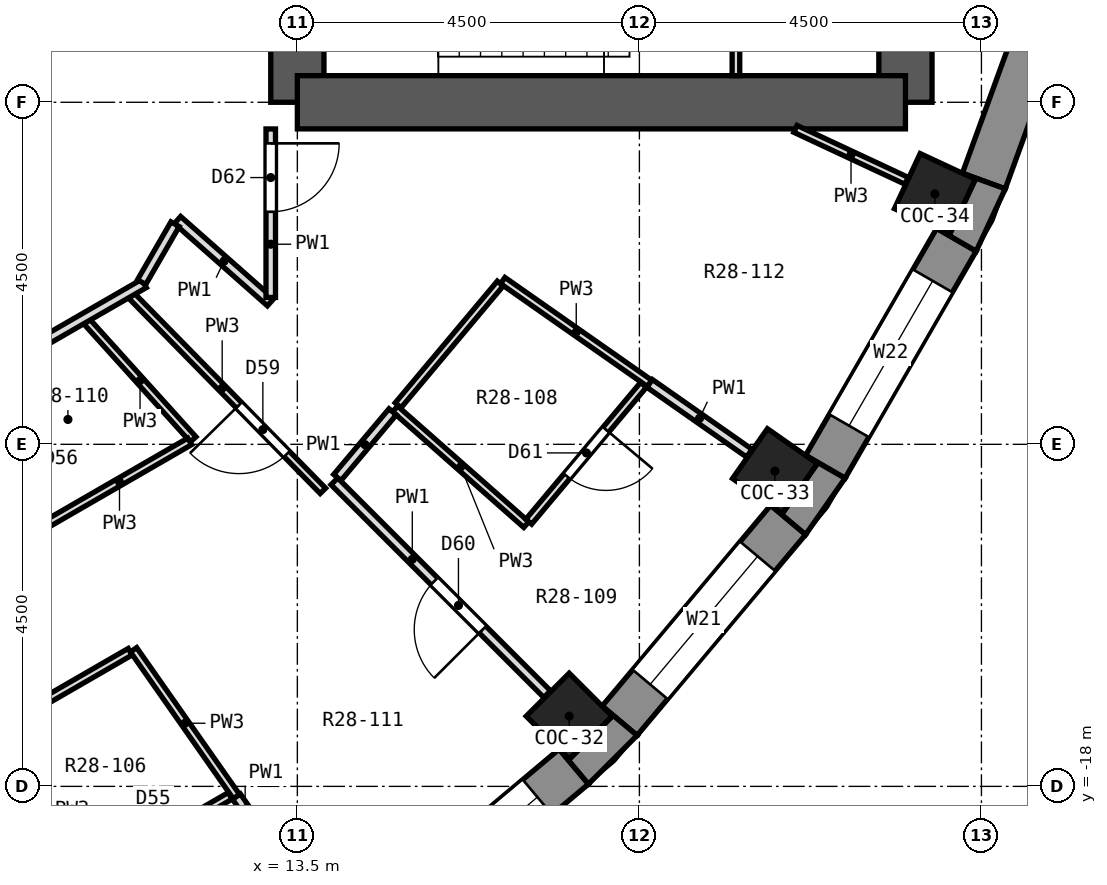
"""IFC4 building model, lengths in metres.
Left out: names, types, materials, properties, quantities, classifications, styles, units other than length and angle.
Written with IfcOpenShell. Run it as: python <this file> out.ifc"""

import sys

from ifc_helpers import new_model, si_unit, direction, frame, frame_2d, origin, origin_2d, place, context, subcontext, project, spatial, polyline, rectangle, outline, extrude, element, fill, save


model = new_model("IFC4")
c1 = context("Model", 3, precision=1e-05, world=origin(), true_north=direction((0.0, 1.0)))
c2 = subcontext(c1, "Body", "Model", "MODEL_VIEW")
j1 = project(units=[si_unit("LENGTHUNIT", "METRE"), si_unit("PLANEANGLEUNIT", "RADIAN")], contexts=[c1])
p1 = place(None, origin())
s1 = spatial("IfcSite", under=j1, at=p1, CompositionType="ELEMENT")
p2 = place(p1, origin())
s2 = spatial("IfcBuilding", under=s1, at=p2, CompositionType="ELEMENT")
p3 = place(p2, frame((0.0, 0.0, 190.5)))
s3 = spatial("IfcBuildingStorey", under=s2, at=p3, CompositionType="ELEMENT", Elevation=190.5)
for number, where, z_axis, x_axis in (
    (1, (17.077, -17.077, 0.0), (0.0, 0.0, 1.0), (0.707, -0.707, 0.0)),
    (2, (19.782, -13.852, 0.0), (0.0, 0.0, 1.0), (0.819, -0.574, 0.0)),
    (3, (21.887, -10.206, 0.0), (0.0, 0.0, 1.0), (0.906, -0.423, 0.0)),
):
    element("IfcColumn", number, at=place(p3, frame(where, z_axis=z_axis, x_axis=x_axis)), inside=s3, PredefinedType="COLUMN", context=c2, shape_type="SweptSolid", body=[
        extrude(rectangle(XDim=0.8, YDim=0.8, at=origin_2d()), origin(), (0.0, 0.0, 1.0), 3.3),
    ])
p4 = place(p3, frame((13.5, -9.0, 0.0), z_axis=(0.0, 0.0, 1.0), x_axis=(0.0, 1.0, 0.0)))
e4 = element("IfcWall", 4, at=p4, inside=s3, PredefinedType="SHEAR", context=c2, shape_type="SweptSolid", body=[
    extrude(rectangle(XDim=18.0, YDim=0.7, at=frame_2d((9.0, 0.0))), origin(), (0.0, 0.0, 1.0), 3.3),
])
p5 = place(p4, frame((15.4, 0.0, 0.0)))
e5 = element("IfcOpeningElement", 5, at=p5, cuts=e4, PredefinedType="OPENING", context=c2, shape_type="SweptSolid", body=[
    extrude(rectangle(XDim=1.2, YDim=2.1, at=frame_2d((0.6, 1.05))), frame((0.0, 0.362, 0.0), z_axis=(0.0, -1.0, 0.0), x_axis=(1.0, 0.0, 0.0)), (0.0, 0.0, 1.0), 0.724),
])
p6 = place(p4, frame((1.4, 0.0, 0.0)))
e6 = element("IfcOpeningElement", 6, at=p6, cuts=e4, PredefinedType="OPENING", context=c2, shape_type="SweptSolid", body=[
    extrude(rectangle(XDim=1.2, YDim=2.1, at=frame_2d((0.6, 1.05))), frame((0.0, 0.362, 0.0), z_axis=(0.0, -1.0, 0.0), x_axis=(1.0, 0.0, 0.0)), (0.0, 0.0, 1.0), 0.724),
])
p7 = place(p4, frame((7.5, 0.0, 0.0)))
e7 = element("IfcOpeningElement", 7, at=p7, cuts=e4, PredefinedType="OPENING", context=c2, shape_type="SweptSolid", body=[
    extrude(rectangle(XDim=3.0, YDim=2.4, at=frame_2d((1.5, 1.2))), frame((0.0, 0.362, 0.0), z_axis=(0.0, -1.0, 0.0), x_axis=(1.0, 0.0, 0.0)), (0.0, 0.0, 1.0), 0.724),
])
p8 = place(p3, frame((21.5, -9.0, 0.0), z_axis=(0.0, 0.0, 1.0), x_axis=(0.0, 1.0, 0.0)))
e8 = element("IfcWall", 8, at=p8, inside=s3, PredefinedType="SHEAR", context=c2, shape_type="SweptSolid", body=[
    extrude(rectangle(XDim=18.0, YDim=0.7, at=frame_2d((9.0, 0.0))), origin(), (0.0, 0.0, 1.0), 3.3),
])
p9 = place(p8, frame((9.45, 0.0, 0.0)))
e9 = element("IfcOpeningElement", 9, at=p9, cuts=e8, PredefinedType="OPENING", context=c2, shape_type="SweptSolid", body=[
    extrude(rectangle(XDim=0.9, YDim=2.1, at=frame_2d((0.45, 1.05))), frame((0.0, 0.362, 0.0), z_axis=(0.0, -1.0, 0.0), x_axis=(1.0, 0.0, 0.0)), (0.0, 0.0, 1.0), 0.724),
])
p10 = place(p8, frame((7.65, 0.0, 0.0)))
e10 = element("IfcOpeningElement", 10, at=p10, cuts=e8, PredefinedType="OPENING", context=c2, shape_type="SweptSolid", body=[
    extrude(rectangle(XDim=0.9, YDim=2.1, at=frame_2d((0.45, 1.05))), frame((0.0, 0.362, 0.0), z_axis=(0.0, -1.0, 0.0), x_axis=(1.0, 0.0, 0.0)), (0.0, 0.0, 1.0), 0.724),
])
p11 = place(p3, frame((13.5, -9.0, 0.0), z_axis=(0.0, 0.0, 1.0), x_axis=(1.0, 0.0, 0.0)))
e11 = element("IfcWall", 11, at=p11, inside=s3, PredefinedType="SHEAR", context=c2, shape_type="SweptSolid", body=[
    extrude(rectangle(XDim=8.0, YDim=0.7, at=frame_2d((4.0, 0.0))), origin(), (0.0, 0.0, 1.0), 3.3),
])
p12 = place(p3, frame((14.494, -19.957, 0.0), z_axis=(0.0, 0.0, 1.0), x_axis=(0.766058884809, 0.642770398358, 0.0)))
e12 = element("IfcWall", 12, at=p12, inside=s3, PredefinedType="SOLIDWALL", context=c2, shape_type="SweptSolid", body=[
    extrude(rectangle(XDim=3.449, YDim=0.6, at=frame_2d((1.725, 0.0))), origin(), (0.0, 0.0, 1.0), 2.85),
])
p13 = place(p12, frame((0.625, 0.0, 0.9)))
e13 = element("IfcOpeningElement", 13, at=p13, cuts=e12, PredefinedType="OPENING", context=c2, shape_type="SweptSolid", body=[
    extrude(rectangle(XDim=2.2, YDim=1.8, at=frame_2d((1.1, 0.9))), frame((0.0, 0.312, 0.0), z_axis=(0.0, -1.0, 0.0), x_axis=(1.0, 0.0, 0.0)), (0.0, 0.0, 1.0), 0.624),
])
p14 = place(p3, frame((17.74, -17.137, 0.0), z_axis=(0.0, 0.0, 1.0), x_axis=(0.642770398358, 0.766058884809, 0.0)))
e14 = element("IfcWall", 14, at=p14, inside=s3, PredefinedType="SOLIDWALL", context=c2, shape_type="SweptSolid", body=[
    extrude(rectangle(XDim=3.449, YDim=0.6, at=frame_2d((1.725, 0.0))), origin(), (0.0, 0.0, 1.0), 2.85),
])
p15 = place(p14, frame((0.625, 0.0, 0.9)))
e15 = element("IfcOpeningElement", 15, at=p15, cuts=e14, PredefinedType="OPENING", context=c2, shape_type="SweptSolid", body=[
    extrude(rectangle(XDim=2.2, YDim=1.8, at=frame_2d((1.1, 0.9))), frame((0.0, 0.312, 0.0), z_axis=(0.0, -1.0, 0.0), x_axis=(1.0, 0.0, 0.0)), (0.0, 0.0, 1.0), 0.624),
])
p16 = place(p3, frame((20.446, -13.796, 0.0), z_axis=(0.0, 0.0, 1.0), x_axis=(0.499998129301, 0.86602648383, 0.0)))
e16 = element("IfcWall", 16, at=p16, inside=s3, PredefinedType="SOLIDWALL", context=c2, shape_type="SweptSolid", body=[
    extrude(rectangle(XDim=3.45, YDim=0.6, at=frame_2d((1.725, 0.0))), origin(), (0.0, 0.0, 1.0), 2.85),
])
p17 = place(p16, frame((0.625, 0.0, 0.9)))
e17 = element("IfcOpeningElement", 17, at=p17, cuts=e16, PredefinedType="OPENING", context=c2, shape_type="SweptSolid", body=[
    extrude(rectangle(XDim=2.2, YDim=1.8, at=frame_2d((1.1, 0.9))), frame((0.0, 0.312, 0.0), z_axis=(0.0, -1.0, 0.0), x_axis=(1.0, 0.0, 0.0)), (0.0, 0.0, 1.0), 0.624),
])
p18 = place(p3, frame((22.531, -10.036, 0.0), z_axis=(0.0, 0.0, 1.0), x_axis=(0.342032843455, 0.93968799822, 0.0)))
e18 = element("IfcWall", 18, at=p18, inside=s3, PredefinedType="SOLIDWALL", context=c2, shape_type="SweptSolid", body=[
    extrude(rectangle(XDim=3.45, YDim=0.6, at=frame_2d((1.725, 0.0))), origin(), (0.0, 0.0, 1.0), 2.85),
])
p19 = place(p3, origin())
e19 = element("IfcWall", 19, at=p19, inside=s3, PredefinedType="SOLIDWALL", context=c2, shape_type="SweptSolid", body=[
    extrude(outline(polyline([(17.969, -17.33), (17.51, -16.944), (17.642, -17.077), (17.077, -17.642), (16.944, -17.51), (17.33, -17.969), (17.969, -17.33)])), origin(), (0.0, 0.0, 1.0), 2.85),
])
p20 = place(p3, origin())
e20 = element("IfcWall", 20, at=p20, inside=s3, PredefinedType="SOLIDWALL", context=c2, shape_type="SweptSolid", body=[
    extrude(outline(polyline([(20.187, -14.687), (20.706, -13.946), (20.186, -13.646), (20.34, -13.754), (19.881, -14.409), (19.727, -14.302), (20.187, -14.687)])), origin(), (0.0, 0.0, 1.0), 2.85),
])
p21 = place(p3, origin())
e21 = element("IfcWall", 21, at=p21, inside=s3, PredefinedType="SOLIDWALL", context=c2, shape_type="SweptSolid", body=[
    extrude(outline(polyline([(22.813, -10.139), (22.249, -9.934), (22.419, -10.013), (22.081, -10.738), (21.911, -10.659), (22.431, -10.959), (22.813, -10.139)])), origin(), (0.0, 0.0, 1.0), 2.85),
])
p22 = place(p3, frame((9.436, -17.305, 0.0), z_axis=(0.0, 0.0, 1.0), x_axis=(0.478926465157, -0.877855022753, 0.0)))
e22 = element("IfcWall", 22, at=p22, inside=s3, PredefinedType="PARTITIONING", context=c2, shape_type="SweptSolid", body=[
    extrude(rectangle(XDim=2.301, YDim=0.1, at=frame_2d((1.15, 0.0))), origin(), (0.0, 0.0, 1.0), 2.85),
])
p23 = place(p3, frame((11.345, -16.203, 0.0), z_axis=(0.0, 0.0, 1.0), x_axis=(0.573823443789, -0.818979032307, 0.0)))
e23 = element("IfcWall", 23, at=p23, inside=s3, PredefinedType="PARTITIONING", context=c2, shape_type="SweptSolid", body=[
    extrude(rectangle(XDim=2.359, YDim=0.1, at=frame_2d((1.18, 0.0))), origin(), (0.0, 0.0, 1.0), 2.85),
])
p24 = place(p3, frame((12.699, -18.135, 0.0), z_axis=(0.0, 0.0, 1.0), x_axis=(0.57352374907, -0.819188933795, 0.0)))
e24 = element("IfcWall", 24, at=p24, inside=s3, PredefinedType="PARTITIONING", context=c2, shape_type="SweptSolid", body=[
    extrude(rectangle(XDim=1.601, YDim=0.125, at=frame_2d((0.801, 0.0))), origin(), (0.0, 0.0, 1.0), 2.85),
])
p25 = place(p24, frame((0.553, 0.0, 0.0)))
e25 = element("IfcOpeningElement", 25, at=p25, cuts=e24, PredefinedType="OPENING", context=c2, shape_type="SweptSolid", body=[
    extrude(rectangle(XDim=0.9, YDim=2.1, at=frame_2d((0.45, 1.05))), frame((0.0, 0.074, 0.0), z_axis=(0.0, -1.0, 0.0), x_axis=(1.0, 0.0, 0.0)), (0.0, 0.0, 1.0), 0.149),
])
p26 = place(p3, frame((10.732, -11.888, 0.0), z_axis=(0.0, 0.0, 1.0), x_axis=(0.670051109138, -0.742314967613, 0.0)))
e26 = element("IfcWall", 26, at=p26, inside=s3, PredefinedType="PARTITIONING", context=c2, shape_type="SweptSolid", body=[
    extrude(rectangle(XDim=2.084, YDim=0.1, at=frame_2d((1.042, 0.0))), origin(), (0.0, 0.0, 1.0), 2.85),
])
p27 = place(p3, frame((11.321, -11.547, 0.0), z_axis=(0.0, 0.0, 1.0), x_axis=(0.700209333058, -0.713937595241, 0.0)))
e27 = element("IfcWall", 27, at=p27, inside=s3, PredefinedType="PARTITIONING", context=c2, shape_type="SweptSolid", body=[
    extrude(rectangle(XDim=3.592, YDim=0.1, at=frame_2d((1.796, 0.0))), origin(), (0.0, 0.0, 1.0), 2.85),
])
p28 = place(p27, frame((2.014, 0.0, 0.0)))
e28 = element("IfcOpeningElement", 28, at=p28, cuts=e27, PredefinedType="OPENING", context=c2, shape_type="SweptSolid", body=[
    extrude(rectangle(XDim=0.9, YDim=2.1, at=frame_2d((0.45, 1.05))), frame((0.0, 0.062, 0.0), z_axis=(0.0, -1.0, 0.0), x_axis=(1.0, 0.0, 0.0)), (0.0, 0.0, 1.0), 0.124),
])
p29 = place(p3, frame((13.987, -13.987, 0.0), z_axis=(0.0, 0.0, 1.0), x_axis=(0.707106781187, -0.707106781187, 0.0)))
e29 = element("IfcWall", 29, at=p29, inside=s3, PredefinedType="PARTITIONING", context=c2, shape_type="SweptSolid", body=[
    extrude(rectangle(XDim=3.959, YDim=0.125, at=frame_2d((1.979, 0.0))), origin(), (0.0, 0.0, 1.0), 2.85),
])
p30 = place(p29, frame((1.859, 0.0, 0.0)))
e30 = element("IfcOpeningElement", 30, at=p30, cuts=e29, PredefinedType="OPENING", context=c2, shape_type="SweptSolid", body=[
    extrude(rectangle(XDim=0.9, YDim=2.1, at=frame_2d((0.45, 1.05))), frame((0.0, 0.074, 0.0), z_axis=(0.0, -1.0, 0.0), x_axis=(1.0, 0.0, 0.0)), (0.0, 0.0, 1.0), 0.149),
])
p31 = place(p3, frame((11.923, -10.549, 0.0), z_axis=(0.0, 0.0, 1.0), x_axis=(0.749253207289, -0.662283648724, 0.0)))
e31 = element("IfcWall", 31, at=p31, inside=s3, PredefinedType="PARTITIONING", context=c2, shape_type="SweptSolid", body=[
    extrude(rectangle(XDim=1.634, YDim=0.125, at=frame_2d((0.817, 0.0))), origin(), (0.0, 0.0, 1.0), 2.85),
])
p32 = place(p3, frame((14.786, -13.034, 0.0), z_axis=(0.0, 0.0, 1.0), x_axis=(0.750060726962, -0.661368963491, 0.0)))
e32 = element("IfcWall", 32, at=p32, inside=s3, PredefinedType="PARTITIONING", context=c2, shape_type="SweptSolid", body=[
    extrude(rectangle(XDim=2.301, YDim=0.1, at=frame_2d((1.151, 0.0))), origin(), (0.0, 0.0, 1.0), 2.85),
])
p33 = place(p3, frame((16.202, -11.346, 0.0), z_axis=(0.0, 0.0, 1.0), x_axis=(0.81919302467, -0.573517905851, 0.0)))
e33 = element("IfcWall", 33, at=p33, inside=s3, PredefinedType="PARTITIONING", context=c2, shape_type="SweptSolid", body=[
    extrude(rectangle(XDim=2.359, YDim=0.1, at=frame_2d((1.18, 0.0))), origin(), (0.0, 0.0, 1.0), 2.85),
])
p34 = place(p3, frame((18.135, -12.699, 0.0), z_axis=(0.0, 0.0, 1.0), x_axis=(0.819188933795, -0.57352374907, 0.0)))
e34 = element("IfcWall", 34, at=p34, inside=s3, PredefinedType="PARTITIONING", context=c2, shape_type="SweptSolid", body=[
    extrude(rectangle(XDim=1.601, YDim=0.125, at=frame_2d((0.801, 0.0))), origin(), (0.0, 0.0, 1.0), 2.85),
])
p35 = place(p3, frame((20.053, -9.35, 0.0), z_axis=(0.0, 0.0, 1.0), x_axis=(0.906055596822, -0.423158664648, 0.0)))
e35 = element("IfcWall", 35, at=p35, inside=s3, PredefinedType="PARTITIONING", context=c2, shape_type="SweptSolid", body=[
    extrude(rectangle(XDim=1.614, YDim=0.1, at=frame_2d((0.807, 0.0))), origin(), (0.0, 0.0, 1.0), 2.85),
])
p36 = place(p3, frame((10.581, -19.3, 0.0), z_axis=(0.0, 0.0, 1.0), x_axis=(0.866009076391, 0.500028278809, 0.0)))
e36 = element("IfcWall", 36, at=p36, inside=s3, PredefinedType="PARTITIONING", context=c2, shape_type="SweptSolid", body=[
    extrude(rectangle(XDim=2.349, YDim=0.1, at=frame_2d((1.175, 0.0))), origin(), (0.0, 0.0, 1.0), 2.85),
])
p37 = place(p36, frame((0.781, 0.0, 0.0)))
e37 = element("IfcOpeningElement", 37, at=p37, cuts=e36, PredefinedType="OPENING", context=c2, shape_type="SweptSolid", body=[
    extrude(rectangle(XDim=0.8, YDim=2.1, at=frame_2d((0.4, 1.05))), frame((0.0, 0.062, 0.0), z_axis=(0.0, -1.0, 0.0), x_axis=(1.0, 0.0, 0.0)), (0.0, 0.0, 1.0), 0.124),
])
p38 = place(p3, frame((9.479, -17.28, 0.0), z_axis=(0.0, 0.0, 1.0), x_axis=(0.86606956535, 0.499923502123, 0.0)))
e38 = element("IfcWall", 38, at=p38, inside=s3, PredefinedType="PARTITIONING", context=c2, shape_type="SweptSolid", body=[
    extrude(rectangle(XDim=2.102, YDim=0.1, at=frame_2d((1.051, 0.0))), origin(), (0.0, 0.0, 1.0), 2.85),
])
p39 = place(p3, frame((10.236, -14.528, 0.0), z_axis=(0.0, 0.0, 1.0), x_axis=(0.865995020583, 0.500052621557, 0.0)))
e39 = element("IfcWall", 39, at=p39, inside=s3, PredefinedType="PARTITIONING", context=c2, shape_type="SweptSolid", body=[
    extrude(rectangle(XDim=2.134, YDim=0.1, at=frame_2d((1.067, 0.0))), origin(), (0.0, 0.0, 1.0), 2.85),
])
p40 = place(p3, frame((4.234, -15.569, 0.0), z_axis=(0.0, 0.0, 1.0), x_axis=(0.866024799292, 0.50000104701, 0.0)))
e40 = element("IfcWall", 40, at=p40, inside=s3, PredefinedType="PARTITIONING", context=c2, shape_type="SweptSolid", body=[
    extrude(rectangle(XDim=8.37, YDim=0.125, at=frame_2d((4.185, 0.0))), origin(), (0.0, 0.0, 1.0), 2.85),
])
p41 = place(p3, frame((14.026, -13.937, 0.0), z_axis=(0.0, 0.0, 1.0), x_axis=(0.644129091811, 0.764916801412, 0.0)))
e41 = element("IfcWall", 41, at=p41, inside=s3, PredefinedType="PARTITIONING", context=c2, shape_type="SweptSolid", body=[
    extrude(rectangle(XDim=1.13, YDim=0.125, at=frame_2d((0.565, 0.0))), origin(), (0.0, 0.0, 1.0), 2.85),
])
p42 = place(p3, frame((16.544, -14.518, 0.0), z_axis=(0.0, 0.0, 1.0), x_axis=(0.642675237257, 0.76613872074, 0.0)))
e42 = element("IfcWall", 42, at=p42, inside=s3, PredefinedType="PARTITIONING", context=c2, shape_type="SweptSolid", body=[
    extrude(rectangle(XDim=2.349, YDim=0.1, at=frame_2d((1.175, 0.0))), origin(), (0.0, 0.0, 1.0), 2.85),
])
p43 = place(p42, frame((0.781, 0.0, 0.0)))
e43 = element("IfcOpeningElement", 43, at=p43, cuts=e42, PredefinedType="OPENING", context=c2, shape_type="SweptSolid", body=[
    extrude(rectangle(XDim=0.8, YDim=2.1, at=frame_2d((0.4, 1.05))), frame((0.0, 0.062, 0.0), z_axis=(0.0, -1.0, 0.0), x_axis=(1.0, 0.0, 0.0)), (0.0, 0.0, 1.0), 0.124),
])
p44 = place(p3, frame((14.826, -12.986, 0.0), z_axis=(0.0, 0.0, 1.0), x_axis=(0.642720670629, 0.766100606674, 0.0)))
e44 = element("IfcWall", 44, at=p44, inside=s3, PredefinedType="PARTITIONING", context=c2, shape_type="SweptSolid", body=[
    extrude(rectangle(XDim=2.09, YDim=0.1, at=frame_2d((1.045, 0.0))), origin(), (0.0, 0.0, 1.0), 2.85),
])
p45 = place(p3, frame((11.451, -11.366, 0.0), z_axis=(0.0, 0.0, 1.0), x_axis=(0.500018690203, 0.866014612722, 0.0)))
e45 = element("IfcWall", 45, at=p45, inside=s3, PredefinedType="PARTITIONING", context=c2, shape_type="SweptSolid", body=[
    extrude(rectangle(XDim=0.88, YDim=0.125, at=frame_2d((0.44, 0.0))), origin(), (0.0, 0.0, 1.0), 2.85),
])
p46 = place(p3, frame((13.15, -11.567, 0.0), z_axis=(0.0, 0.0, 1.0), x_axis=(0.0, 1.0, 0.0)))
e46 = element("IfcWall", 46, at=p46, inside=s3, PredefinedType="PARTITIONING", context=c2, shape_type="SweptSolid", body=[
    extrude(rectangle(XDim=2.216, YDim=0.125, at=frame_2d((1.108, 0.0))), origin(), (0.0, 0.0, 1.0), 2.85),
])
p47 = place(p46, frame((1.127, 0.0, 0.0)))
e47 = element("IfcOpeningElement", 47, at=p47, cuts=e46, PredefinedType="OPENING", context=c2, shape_type="SweptSolid", body=[
    extrude(rectangle(XDim=0.9, YDim=2.1, at=frame_2d((0.45, 1.05))), frame((0.0, 0.074, 0.0), z_axis=(0.0, -1.0, 0.0), x_axis=(1.0, 0.0, 0.0)), (0.0, 0.0, 1.0), 0.149),
])
p48 = place(p3, frame((19.27, -8.65, 0.0), z_axis=(0.0, 0.0, 1.0), x_axis=(0.0, 1.0, 0.0)))
e48 = element("IfcWall", 48, at=p48, inside=s3, PredefinedType="PARTITIONING", context=c2, shape_type="SweptSolid", body=[
    extrude(rectangle(XDim=3.45, YDim=0.1, at=frame_2d((1.725, 0.0))), origin(), (0.0, 0.0, 1.0), 2.85),
])
p49 = place(p13, origin())
e49 = element("IfcWindow", 49, at=p49, inside=s3, PartitioningType="SINGLE_PANEL", PredefinedType="WINDOW", context=c2, shape_type="SweptSolid", body=[
    extrude(rectangle(XDim=2.2, YDim=1.8, at=frame_2d((1.1, 0.9))), frame((0.0, 0.18, 0.0), z_axis=(0.0, -1.0, 0.0), x_axis=(1.0, 0.0, 0.0)), (0.0, 0.0, 1.0), 0.06),
])
fill(e13, e49)
p50 = place(p15, origin())
e50 = element("IfcWindow", 50, at=p50, inside=s3, PartitioningType="SINGLE_PANEL", PredefinedType="WINDOW", context=c2, shape_type="SweptSolid", body=[
    extrude(rectangle(XDim=2.2, YDim=1.8, at=frame_2d((1.1, 0.9))), frame((0.0, 0.18, 0.0), z_axis=(0.0, -1.0, 0.0), x_axis=(1.0, 0.0, 0.0)), (0.0, 0.0, 1.0), 0.06),
])
fill(e15, e50)
p51 = place(p17, origin())
e51 = element("IfcWindow", 51, at=p51, inside=s3, PartitioningType="SINGLE_PANEL", PredefinedType="WINDOW", context=c2, shape_type="SweptSolid", body=[
    extrude(rectangle(XDim=2.2, YDim=1.8, at=frame_2d((1.1, 0.9))), frame((0.0, 0.18, 0.0), z_axis=(0.0, -1.0, 0.0), x_axis=(1.0, 0.0, 0.0)), (0.0, 0.0, 1.0), 0.06),
])
fill(e17, e51)
p52 = place(p28, frame((0.9, 0.0, 0.0), z_axis=(0.0, 0.0, 1.0), x_axis=(-1.0, 0.0, 0.0)))
e52 = element("IfcDoor", 52, at=p52, inside=s3, OperationType="SINGLE_SWING_RIGHT", PredefinedType="DOOR", context=c2, shape_type="SweptSolid", body=[
    extrude(rectangle(XDim=0.9, YDim=2.1, at=frame_2d((0.45, 1.05))), frame((0.0, 0.025, 0.0), z_axis=(0.0, -1.0, 0.0), x_axis=(1.0, 0.0, 0.0)), (0.0, 0.0, 1.0), 0.05),
])
fill(e28, e52)
p53 = place(p30, frame((0.9, 0.0, 0.0), z_axis=(0.0, 0.0, 1.0), x_axis=(-1.0, 0.0, 0.0)))
e53 = element("IfcDoor", 53, at=p53, inside=s3, OperationType="SINGLE_SWING_LEFT", PredefinedType="DOOR", context=c2, shape_type="SweptSolid", body=[
    extrude(rectangle(XDim=0.9, YDim=2.1, at=frame_2d((0.45, 1.05))), frame((0.0, 0.025, 0.0), z_axis=(0.0, -1.0, 0.0), x_axis=(1.0, 0.0, 0.0)), (0.0, 0.0, 1.0), 0.05),
])
fill(e30, e53)
p54 = place(p43, frame((0.8, 0.0, 0.0), z_axis=(0.0, 0.0, 1.0), x_axis=(-1.0, 0.0, 0.0)))
e54 = element("IfcDoor", 54, at=p54, inside=s3, OperationType="SINGLE_SWING_LEFT", PredefinedType="DOOR", context=c2, shape_type="SweptSolid", body=[
    extrude(rectangle(XDim=0.8, YDim=2.1, at=frame_2d((0.4, 1.05))), frame((0.0, 0.025, 0.0), z_axis=(0.0, -1.0, 0.0), x_axis=(1.0, 0.0, 0.0)), (0.0, 0.0, 1.0), 0.05),
])
fill(e43, e54)
p55 = place(p47, frame((0.9, 0.0, 0.0), z_axis=(0.0, 0.0, 1.0), x_axis=(-1.0, 0.0, 0.0)))
e55 = element("IfcDoor", 55, at=p55, inside=s3, OperationType="SINGLE_SWING_LEFT", PredefinedType="DOOR", context=c2, shape_type="SweptSolid", body=[
    extrude(rectangle(XDim=0.9, YDim=2.1, at=frame_2d((0.45, 1.05))), frame((0.0, 0.025, 0.0), z_axis=(0.0, -1.0, 0.0), x_axis=(1.0, 0.0, 0.0)), (0.0, 0.0, 1.0), 0.05),
])
fill(e47, e55)
save(model, sys.argv[1])
